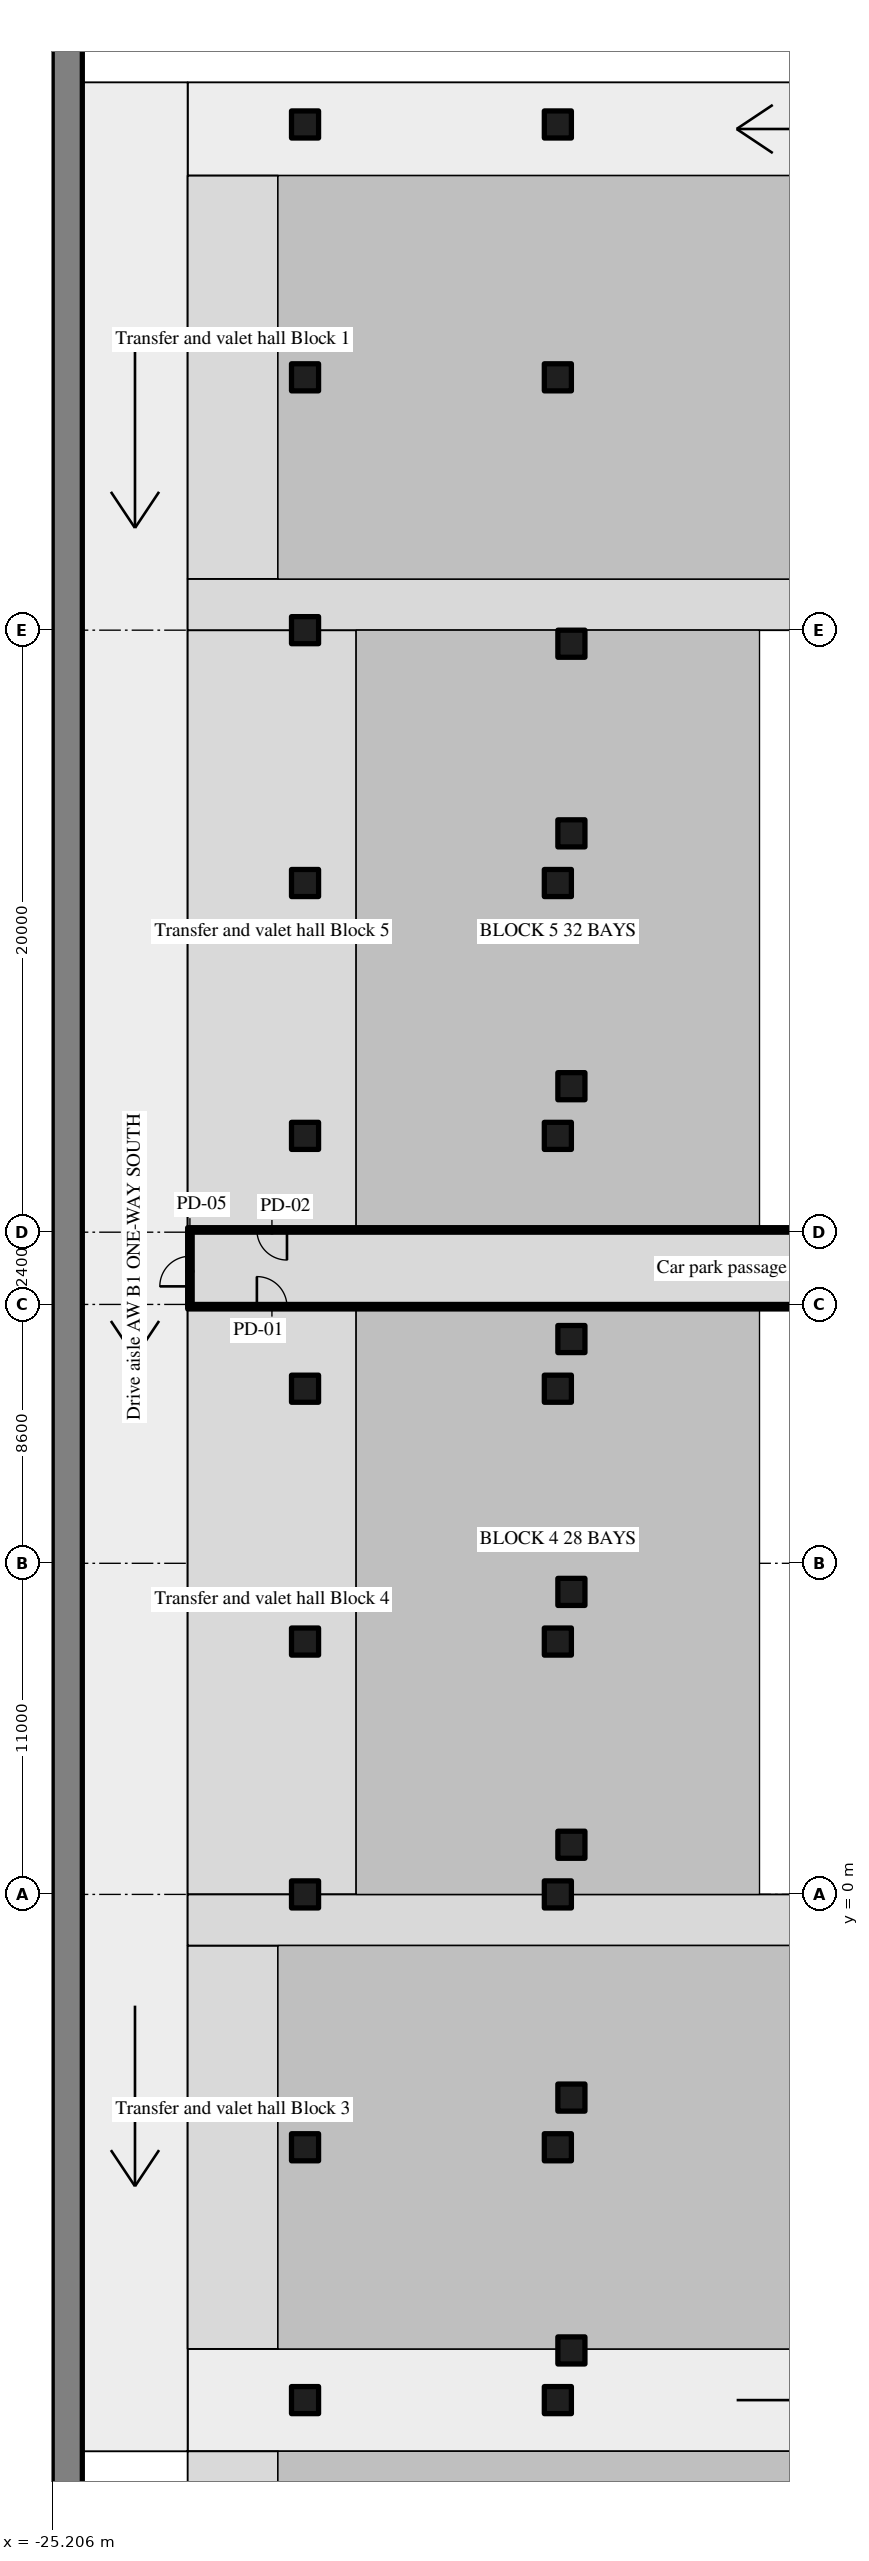
"""IFC4 building model, lengths in metres.
Left out: names, types, materials, properties, quantities, classifications, styles, units other than length and angle.
Written with IfcOpenShell. Run it as: python <this file> out.ifc"""

import sys

from ifc_helpers import new_model, si_unit, direction, frame, frame_2d, origin, origin_2d, place, context, subcontext, project, spatial, rectangle, extrude, source, transform, mapped, element, fill, save


model = new_model("IFC4")
c1 = context("Model", 3, precision=1e-05, world=origin(), true_north=direction((0.0, 1.0)))
c2 = subcontext(c1, "Body", "Model", "MODEL_VIEW")
j1 = project(units=[si_unit("LENGTHUNIT", "METRE"), si_unit("PLANEANGLEUNIT", "RADIAN")], contexts=[c1])
p1 = place(None, origin())
s1 = spatial("IfcSite", under=j1, at=p1, CompositionType="ELEMENT")
p2 = place(p1, origin())
s2 = spatial("IfcBuilding", under=s1, at=p2, CompositionType="ELEMENT")
p3 = place(p2, frame((0.0, 0.0, -4.5)))
s3 = spatial("IfcBuildingStorey", under=s2, at=p3, CompositionType="ELEMENT", Elevation=-4.5)
m1 = source(origin(), c2, "Body", "SweptSolid", [
    extrude(rectangle(XDim=98.8, YDim=1.0, at=frame_2d((49.4, 0.0))), origin(), (0.0, 0.0, 1.0), 4.22),
])
p4 = place(p3, frame((-24.7, -32.6, 0.0), z_axis=(0.0, 0.0, 1.0), x_axis=(0.0, 1.0, 0.0)))
e1 = element("IfcWall", 1, at=p4, inside=s3, PredefinedType="SHEAR", context=c2, shape_type="MappedRepresentation", body=[
    mapped(m1, transform((0.0, 0.0, 0.0), scale=1.0)),
])
m2 = source(origin(), c2, "Body", "SweptSolid", [
    extrude(rectangle(XDim=0.9, YDim=0.9, at=origin_2d()), origin(), (0.0, 0.0, 1.0), 4.22),
])
for number, where, z_axis, x_axis in (
    (2, (-7.95, -15.15, 0.0), (0.0, 0.0, 1.0), (1.0, 0.0, 0.0)),
    (3, (-7.95, -6.75, 0.0), (0.0, 0.0, 1.0), (1.0, 0.0, 0.0)),
    (4, (-7.95, 1.65, 0.0), (0.0, 0.0, 1.0), (1.0, 0.0, 0.0)),
    (5, (-7.95, 10.05, 0.0), (0.0, 0.0, 1.0), (1.0, 0.0, 0.0)),
    (6, (-7.95, 18.45, 0.0), (0.0, 0.0, 1.0), (1.0, 0.0, 0.0)),
    (7, (-7.95, 26.85, 0.0), (0.0, 0.0, 1.0), (1.0, 0.0, 0.0)),
    (8, (-7.95, 35.25, 0.0), (0.0, 0.0, 1.0), (1.0, 0.0, 0.0)),
    (9, (-7.95, 41.55, 0.0), (0.0, 0.0, 1.0), (1.0, 0.0, 0.0)),
    (10, (-16.8, -16.8, 0.0), (0.0, 0.0, 1.0), (1.0, 0.0, 0.0)),
    (11, (-16.8, -8.4, 0.0), (0.0, 0.0, 1.0), (1.0, 0.0, 0.0)),
    (12, (-16.8, 0.0, 0.0), (0.0, 0.0, 1.0), (1.0, 0.0, 0.0)),
    (13, (-16.8, 8.4, 0.0), (0.0, 0.0, 1.0), (1.0, 0.0, 0.0)),
    (14, (-16.8, 16.8, 0.0), (0.0, 0.0, 1.0), (1.0, 0.0, 0.0)),
    (15, (-16.8, 25.2, 0.0), (0.0, 0.0, 1.0), (1.0, 0.0, 0.0)),
    (16, (-16.8, 33.6, 0.0), (0.0, 0.0, 1.0), (1.0, 0.0, 0.0)),
    (17, (-16.8, 42.0, 0.0), (0.0, 0.0, 1.0), (1.0, 0.0, 0.0)),
    (18, (-16.8, 50.4, 0.0), (0.0, 0.0, 1.0), (1.0, 0.0, 0.0)),
    (19, (-16.8, 58.8, 0.0), (0.0, 0.0, 1.0), (1.0, 0.0, 0.0)),
    (20, (-8.4, -16.8, 0.0), (0.0, 0.0, 1.0), (1.0, 0.0, 0.0)),
    (21, (-8.4, -8.4, 0.0), (0.0, 0.0, 1.0), (1.0, 0.0, 0.0)),
    (22, (-8.4, 0.0, 0.0), (0.0, 0.0, 1.0), (1.0, 0.0, 0.0)),
    (23, (-8.4, 8.4, 0.0), (0.0, 0.0, 1.0), (1.0, 0.0, 0.0)),
    (24, (-8.4, 16.8, 0.0), (0.0, 0.0, 1.0), (1.0, 0.0, 0.0)),
    (25, (-8.4, 25.2, 0.0), (0.0, 0.0, 1.0), (1.0, 0.0, 0.0)),
    (26, (-8.4, 33.6, 0.0), (0.0, 0.0, 1.0), (1.0, 0.0, 0.0)),
    (27, (-8.4, 50.4, 0.0), (0.0, 0.0, 1.0), (1.0, 0.0, 0.0)),
    (28, (-8.4, 58.8, 0.0), (0.0, 0.0, 1.0), (1.0, 0.0, 0.0)),
):
    element("IfcColumn", number, at=place(p3, frame(where, z_axis=z_axis, x_axis=x_axis)), inside=s3, PredefinedType="COLUMN", context=c2, shape_type="MappedRepresentation", body=[
        mapped(m2, transform((0.0, 0.0, 0.0), scale=1.0)),
    ])
m3 = source(origin(), c2, "Body", "SweptSolid", [
    extrude(rectangle(XDim=20.7, YDim=0.15, at=frame_2d((10.35, 0.0))), origin(), (0.0, 0.0, 1.0), 4.22),
])
p5 = place(p3, frame((-20.7, 19.525, 0.0), z_axis=(0.0, 0.0, 1.0), x_axis=(1.0, 0.0, 0.0)))
e29 = element("IfcWall", 29, at=p5, inside=s3, PredefinedType="PARTITIONING", context=c2, shape_type="MappedRepresentation", body=[
    mapped(m3, transform((0.0, 0.0, 0.0), scale=1.0)),
])
m4 = source(origin(), c2, "Body", "SweptSolid", [
    extrude(rectangle(XDim=1.0, YDim=2.1, at=frame_2d((0.5, 1.05))), frame((0.0, 0.085, 0.0), z_axis=(0.0, -1.0, 0.0), x_axis=(1.0, 0.0, 0.0)), (0.0, 0.0, 1.0), 0.17),
])
p6 = place(p5, frame((2.3, 0.0, 0.0)))
e30 = element("IfcOpeningElement", 30, at=p6, cuts=e29, PredefinedType="OPENING", context=c2, shape_type="MappedRepresentation", body=[
    mapped(m4, transform((0.0, 0.0, 0.0), scale=1.0)),
])
p7 = place(p3, frame((-20.7, 22.075, 0.0), z_axis=(0.0, 0.0, 1.0), x_axis=(1.0, 0.0, 0.0)))
e31 = element("IfcWall", 31, at=p7, inside=s3, PredefinedType="PARTITIONING", context=c2, shape_type="MappedRepresentation", body=[
    mapped(m3, transform((0.0, 0.0, 0.0), scale=1.0)),
])
p8 = place(p7, frame((2.3, 0.0, 0.0)))
e32 = element("IfcOpeningElement", 32, at=p8, cuts=e31, PredefinedType="OPENING", context=c2, shape_type="MappedRepresentation", body=[
    mapped(m4, transform((0.0, 0.0, 0.0), scale=1.0)),
])
m5 = source(origin(), c2, "Body", "SweptSolid", [
    extrude(rectangle(XDim=2.4, YDim=0.15, at=frame_2d((1.2, 0.0))), origin(), (0.0, 0.0, 1.0), 4.22),
])
p9 = place(p3, frame((-20.625, 19.6, 0.0), z_axis=(0.0, 0.0, 1.0), x_axis=(0.0, 1.0, 0.0)))
e33 = element("IfcWall", 33, at=p9, inside=s3, PredefinedType="PARTITIONING", context=c2, shape_type="MappedRepresentation", body=[
    mapped(m5, transform((0.0, 0.0, 0.0), scale=1.0)),
])
p10 = place(p9, frame((0.6, 0.0, 0.0)))
e34 = element("IfcOpeningElement", 34, at=p10, cuts=e33, PredefinedType="OPENING", context=c2, shape_type="MappedRepresentation", body=[
    mapped(m4, transform((0.0, 0.0, 0.0), scale=1.0)),
])
m6 = source(origin(), c2, "Body", "SweptSolid", [
    extrude(rectangle(XDim=1.0, YDim=2.1, at=frame_2d((0.5, 1.05))), frame((0.0, 0.025, 0.0), z_axis=(0.0, -1.0, 0.0), x_axis=(1.0, 0.0, 0.0)), (0.0, 0.0, 1.0), 0.05),
])
p11 = place(p6, origin())
e35 = element("IfcDoor", 35, at=p11, inside=s3, OperationType="SINGLE_SWING_LEFT", PredefinedType="DOOR", context=c2, shape_type="MappedRepresentation", body=[
    mapped(m6, transform((0.0, 0.0, 0.0), scale=1.0)),
])
fill(e30, e35)
p12 = place(p8, origin())
e36 = element("IfcDoor", 36, at=p12, inside=s3, OperationType="SINGLE_SWING_RIGHT", PredefinedType="DOOR", context=c2, shape_type="MappedRepresentation", body=[
    mapped(m6, transform((0.0, 0.0, 0.0), scale=1.0)),
])
fill(e32, e36)
p13 = place(p10, origin())
e37 = element("IfcDoor", 37, at=p13, inside=s3, OperationType="SINGLE_SWING_LEFT", PredefinedType="DOOR", context=c2, shape_type="MappedRepresentation", body=[
    mapped(m6, transform((0.0, 0.0, 0.0), scale=1.0)),
])
fill(e34, e37)
save(model, sys.argv[1])
